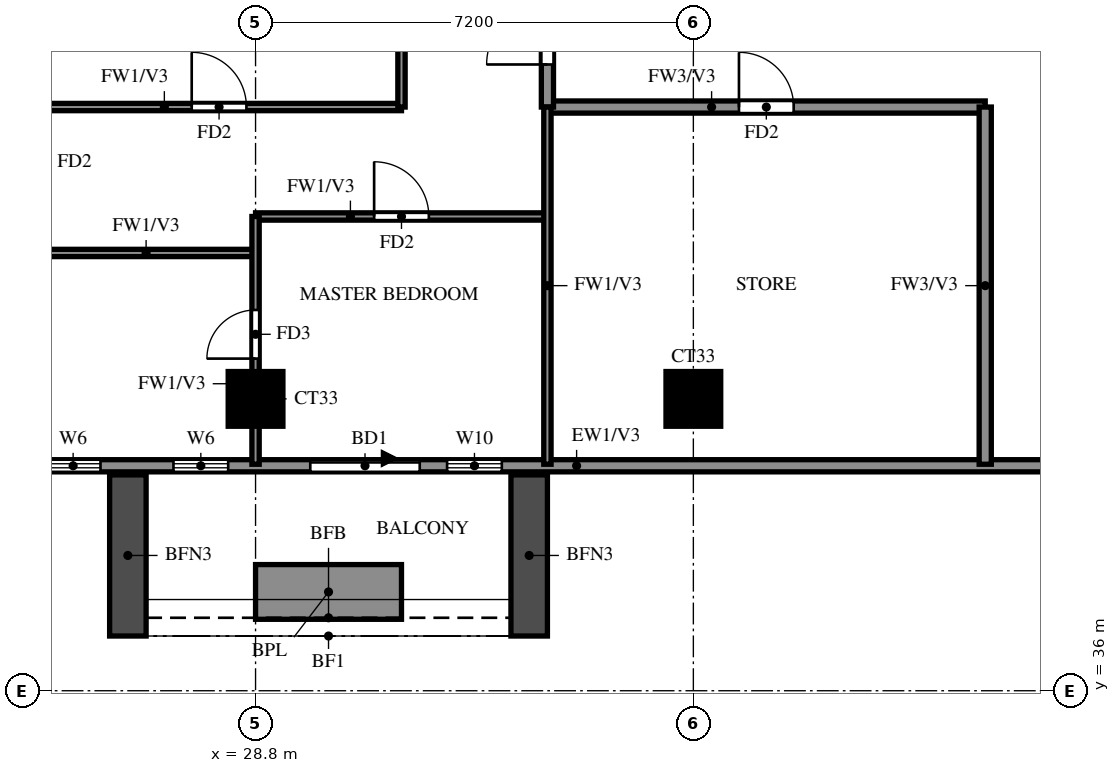
"""IFC4 building model, lengths in metres.
Left out: names, types, materials, properties, quantities, classifications, styles, units other than length and angle.
Written with IfcOpenShell. Run it as: python <this file> out.ifc"""

import sys

from ifc_helpers import new_model, si_unit, direction, frame, frame_2d, origin, origin_2d, place, context, subcontext, project, spatial, rectangle, extrude, source, transform, mapped, element, fill, save


model = new_model("IFC4")
c1 = context("Model", 3, precision=1e-05, world=origin(), true_north=direction((0.0, 1.0)))
c2 = subcontext(c1, "Body", "Model", "MODEL_VIEW")
j1 = project(units=[si_unit("LENGTHUNIT", "METRE"), si_unit("PLANEANGLEUNIT", "RADIAN")], contexts=[c1])
p1 = place(None, origin())
s1 = spatial("IfcSite", under=j1, at=p1, CompositionType="ELEMENT")
p2 = place(p1, origin())
s2 = spatial("IfcBuilding", under=s1, at=p2, CompositionType="ELEMENT")
p3 = place(p2, frame((0.0, 0.0, 218.5)))
s3 = spatial("IfcBuildingStorey", under=s2, at=p3, CompositionType="ELEMENT", Elevation=218.5)
m1 = source(origin(), c2, "Body", "SweptSolid", [
    extrude(rectangle(XDim=0.9, YDim=0.9, at=origin_2d()), origin(), (0.0, 0.0, 1.0), 3.22),
])
for number, where, z_axis, x_axis in (
    (1, (28.8, 40.8, 0.0), (0.0, 0.0, 1.0), (1.0, 0.0, 0.0)),
    (2, (36.0, 40.8, 0.0), (0.0, 0.0, 1.0), (1.0, 0.0, 0.0)),
):
    element("IfcColumn", number, at=place(p3, frame(where, z_axis=z_axis, x_axis=x_axis)), inside=s3, PredefinedType="COLUMN", context=c2, shape_type="MappedRepresentation", body=[
        mapped(m1, transform((0.0, 0.0, 0.0))),
    ])
p4 = place(p3, frame((22.2, 39.7, 0.0), z_axis=(0.0, 0.0, 1.0), x_axis=(1.0, 0.0, 0.0)))
e3 = element("IfcWall", 3, at=p4, inside=s3, PredefinedType="SOLIDWALL", context=c2, shape_type="SweptSolid", body=[
    extrude(rectangle(XDim=19.8, YDim=0.2, at=frame_2d((9.9, 0.0))), origin(), (0.0, 0.0, 1.0), 3.22),
])
p5 = place(p4, frame((7.5, 0.0, 0.0)))
e4 = element("IfcOpeningElement", 4, at=p5, cuts=e3, PredefinedType="OPENING", context=c2, shape_type="SweptSolid", body=[
    extrude(rectangle(XDim=1.8, YDim=2.4, at=frame_2d((0.9, 1.2))), frame((0.0, 0.11, 0.0), z_axis=(0.0, -1.0, 0.0), x_axis=(1.0, 0.0, 0.0)), (0.0, 0.0, 1.0), 0.22),
])
p6 = place(p4, frame((0.7, 0.0, 0.6)))
e5 = element("IfcOpeningElement", 5, at=p6, cuts=e3, PredefinedType="OPENING", context=c2, shape_type="SweptSolid", body=[
    extrude(rectangle(XDim=1.8, YDim=2.4, at=frame_2d((0.9, 1.2))), frame((0.0, 0.11, 0.0), z_axis=(0.0, -1.0, 0.0), x_axis=(1.0, 0.0, 0.0)), (0.0, 0.0, 1.0), 0.22),
])
p7 = place(p4, frame((9.75, 0.0, 0.6)))
e6 = element("IfcOpeningElement", 6, at=p7, cuts=e3, PredefinedType="OPENING", context=c2, shape_type="SweptSolid", body=[
    extrude(rectangle(XDim=0.9, YDim=2.4, at=frame_2d((0.45, 1.2))), frame((0.0, 0.11, 0.0), z_axis=(0.0, -1.0, 0.0), x_axis=(1.0, 0.0, 0.0)), (0.0, 0.0, 1.0), 0.22),
])
p8 = place(p4, frame((3.15, 0.0, 1.5)))
e7 = element("IfcOpeningElement", 7, at=p8, cuts=e3, PredefinedType="OPENING", context=c2, shape_type="SweptSolid", body=[
    extrude(rectangle(XDim=0.9, YDim=0.9, at=frame_2d((0.45, 0.45))), frame((0.0, 0.11, 0.0), z_axis=(0.0, -1.0, 0.0), x_axis=(1.0, 0.0, 0.0)), (0.0, 0.0, 1.0), 0.22),
])
p9 = place(p4, frame((5.25, 0.0, 1.5)))
e8 = element("IfcOpeningElement", 8, at=p9, cuts=e3, PredefinedType="OPENING", context=c2, shape_type="SweptSolid", body=[
    extrude(rectangle(XDim=0.9, YDim=0.9, at=frame_2d((0.45, 0.45))), frame((0.0, 0.11, 0.0), z_axis=(0.0, -1.0, 0.0), x_axis=(1.0, 0.0, 0.0)), (0.0, 0.0, 1.0), 0.22),
])
for number, where, z_axis, x_axis in (
    (9, (26.7, 39.55, 0.0), (0.0, 0.0, 1.0), (0.0, -1.0, 0.0)),
    (10, (33.3, 39.55, 0.0), (0.0, 0.0, 1.0), (0.0, -1.0, 0.0)),
):
    element("IfcWall", number, at=place(p3, frame(where, z_axis=z_axis, x_axis=x_axis)), inside=s3, PredefinedType="SOLIDWALL", context=c2, shape_type="SweptSolid", body=[
        extrude(rectangle(XDim=2.65, YDim=0.6, at=frame_2d((1.325, 0.0))), origin(), (0.0, 0.0, 1.0), 2.85),
    ])
p10 = place(p3, frame((28.8, 37.625, 0.0), z_axis=(0.0, 0.0, 1.0), x_axis=(1.0, 0.0, 0.0)))
e11 = element("IfcWall", 11, at=p10, inside=s3, PredefinedType="SOLIDWALL", context=c2, shape_type="SweptSolid", body=[
    extrude(rectangle(XDim=2.4, YDim=0.9, at=frame_2d((1.2, 0.0))), origin(), (0.0, 0.0, 1.0), 0.9),
])
p11 = place(p3, frame((33.6, 45.6, 0.0), z_axis=(0.0, 0.0, 1.0), x_axis=(1.0, 0.0, 0.0)))
e12 = element("IfcWall", 12, at=p11, inside=s3, PredefinedType="SOLIDWALL", context=c2, shape_type="SweptSolid", body=[
    extrude(rectangle(XDim=7.2, YDim=0.2, at=frame_2d((3.6, 0.0))), origin(), (0.0, 0.0, 1.0), 3.22),
])
p12 = place(p11, frame((3.15, 0.0, 0.0)))
e13 = element("IfcOpeningElement", 13, at=p12, cuts=e12, PredefinedType="OPENING", context=c2, shape_type="SweptSolid", body=[
    extrude(rectangle(XDim=0.9, YDim=2.1, at=frame_2d((0.45, 1.05))), frame((0.0, 0.11, 0.0), z_axis=(0.0, -1.0, 0.0), x_axis=(1.0, 0.0, 0.0)), (0.0, 0.0, 1.0), 0.22),
])
p13 = place(p3, frame((33.6, 45.6, 0.0), z_axis=(0.0, 0.0, 1.0), x_axis=(0.0, 1.0, 0.0)))
e14 = element("IfcWall", 14, at=p13, inside=s3, PredefinedType="SOLIDWALL", context=c2, shape_type="SweptSolid", body=[
    extrude(rectangle(XDim=8.4, YDim=0.2, at=frame_2d((4.2, 0.0))), origin(), (0.0, 0.0, 1.0), 3.22),
])
p14 = place(p13, frame((0.7, 0.0, 0.0)))
e15 = element("IfcOpeningElement", 15, at=p14, cuts=e14, PredefinedType="OPENING", context=c2, shape_type="SweptSolid", body=[
    extrude(rectangle(XDim=1.0, YDim=2.1, at=frame_2d((0.5, 1.05))), frame((0.0, 0.11, 0.0), z_axis=(0.0, -1.0, 0.0), x_axis=(1.0, 0.0, 0.0)), (0.0, 0.0, 1.0), 0.22),
])
p15 = place(p13, frame((6.7, 0.0, 0.0)))
e16 = element("IfcOpeningElement", 16, at=p15, cuts=e14, PredefinedType="OPENING", context=c2, shape_type="SweptSolid", body=[
    extrude(rectangle(XDim=1.0, YDim=2.1, at=frame_2d((0.5, 1.05))), frame((0.0, 0.11, 0.0), z_axis=(0.0, -1.0, 0.0), x_axis=(1.0, 0.0, 0.0)), (0.0, 0.0, 1.0), 0.22),
])
p16 = place(p3, frame((40.8, 39.725, 0.0), z_axis=(0.0, 0.0, 1.0), x_axis=(0.0, 1.0, 0.0)))
e17 = element("IfcWall", 17, at=p16, inside=s3, PredefinedType="SOLIDWALL", context=c2, shape_type="SweptSolid", body=[
    extrude(rectangle(XDim=5.875, YDim=0.2, at=frame_2d((2.938, 0.0))), origin(), (0.0, 0.0, 1.0), 3.22),
])
p17 = place(p3, frame((25.2, 43.2, 0.0), z_axis=(0.0, 0.0, 1.0), x_axis=(1.0, 0.0, 0.0)))
e18 = element("IfcWall", 18, at=p17, inside=s3, PredefinedType="PARTITIONING", context=c2, shape_type="SweptSolid", body=[
    extrude(rectangle(XDim=3.6, YDim=0.12, at=frame_2d((1.8, 0.0))), origin(), (0.0, 0.0, 1.0), 3.22),
])
p18 = place(p3, frame((28.8, 43.8, 0.0), z_axis=(0.0, 0.0, 1.0), x_axis=(1.0, 0.0, 0.0)))
e19 = element("IfcWall", 19, at=p18, inside=s3, PredefinedType="PARTITIONING", context=c2, shape_type="SweptSolid", body=[
    extrude(rectangle(XDim=4.8, YDim=0.12, at=frame_2d((2.4, 0.0))), origin(), (0.0, 0.0, 1.0), 3.22),
])
p19 = place(p18, frame((1.95, 0.0, 0.0)))
e20 = element("IfcOpeningElement", 20, at=p19, cuts=e19, PredefinedType="OPENING", context=c2, shape_type="SweptSolid", body=[
    extrude(rectangle(XDim=0.9, YDim=2.1, at=frame_2d((0.45, 1.05))), frame((0.0, 0.07, 0.0), z_axis=(0.0, -1.0, 0.0), x_axis=(1.0, 0.0, 0.0)), (0.0, 0.0, 1.0), 0.14),
])
p20 = place(p3, frame((25.2, 45.6, 0.0), z_axis=(0.0, 0.0, 1.0), x_axis=(1.0, 0.0, 0.0)))
e21 = element("IfcWall", 21, at=p20, inside=s3, PredefinedType="PARTITIONING", context=c2, shape_type="SweptSolid", body=[
    extrude(rectangle(XDim=6.0, YDim=0.12, at=frame_2d((3.0, 0.0))), origin(), (0.0, 0.0, 1.0), 3.22),
])
p21 = place(p20, frame((2.55, 0.0, 0.0)))
e22 = element("IfcOpeningElement", 22, at=p21, cuts=e21, PredefinedType="OPENING", context=c2, shape_type="SweptSolid", body=[
    extrude(rectangle(XDim=0.9, YDim=2.1, at=frame_2d((0.45, 1.05))), frame((0.0, 0.07, 0.0), z_axis=(0.0, -1.0, 0.0), x_axis=(1.0, 0.0, 0.0)), (0.0, 0.0, 1.0), 0.14),
])
p22 = place(p3, frame((28.8, 39.725, 0.0), z_axis=(0.0, 0.0, 1.0), x_axis=(0.0, 1.0, 0.0)))
e23 = element("IfcWall", 23, at=p22, inside=s3, PredefinedType="PARTITIONING", context=c2, shape_type="SweptSolid", body=[
    extrude(rectangle(XDim=4.075, YDim=0.12, at=frame_2d((2.038, 0.0))), origin(), (0.0, 0.0, 1.0), 3.22),
])
p23 = place(p22, frame((1.738, 0.0, 0.0)))
e24 = element("IfcOpeningElement", 24, at=p23, cuts=e23, PredefinedType="OPENING", context=c2, shape_type="SweptSolid", body=[
    extrude(rectangle(XDim=0.8, YDim=2.1, at=frame_2d((0.4, 1.05))), frame((0.0, 0.07, 0.0), z_axis=(0.0, -1.0, 0.0), x_axis=(1.0, 0.0, 0.0)), (0.0, 0.0, 1.0), 0.14),
])
p24 = place(p3, frame((31.2, 45.6, 0.0), z_axis=(0.0, 0.0, 1.0), x_axis=(0.0, 1.0, 0.0)))
e25 = element("IfcWall", 25, at=p24, inside=s3, PredefinedType="PARTITIONING", context=c2, shape_type="SweptSolid", body=[
    extrude(rectangle(XDim=2.4, YDim=0.12, at=frame_2d((1.2, 0.0))), origin(), (0.0, 0.0, 1.0), 3.22),
])
p25 = place(p3, frame((33.6, 39.725, 0.0), z_axis=(0.0, 0.0, 1.0), x_axis=(0.0, 1.0, 0.0)))
e26 = element("IfcWall", 26, at=p25, inside=s3, PredefinedType="PARTITIONING", context=c2, shape_type="SweptSolid", body=[
    extrude(rectangle(XDim=5.875, YDim=0.12, at=frame_2d((2.938, 0.0))), origin(), (0.0, 0.0, 1.0), 3.22),
])
p26 = place(p5, origin())
e27 = element("IfcDoor", 27, at=p26, inside=s3, OperationType="DOUBLE_DOOR_SLIDING", PredefinedType="DOOR", context=c2, shape_type="SweptSolid", body=[
    extrude(rectangle(XDim=1.8, YDim=2.4, at=frame_2d((0.9, 1.2))), frame((0.0, 0.025, 0.0), z_axis=(0.0, -1.0, 0.0), x_axis=(1.0, 0.0, 0.0)), (0.0, 0.0, 1.0), 0.05),
])
fill(e4, e27)
p27 = place(p7, origin())
e28 = element("IfcWindow", 28, at=p27, inside=s3, PartitioningType="SINGLE_PANEL", PredefinedType="WINDOW", context=c2, shape_type="SweptSolid", body=[
    extrude(rectangle(XDim=0.9, YDim=2.4, at=frame_2d((0.45, 1.2))), frame((0.0, 0.03, 0.0), z_axis=(0.0, -1.0, 0.0), x_axis=(1.0, 0.0, 0.0)), (0.0, 0.0, 1.0), 0.06),
])
fill(e6, e28)
p28 = place(p8, origin())
e29 = element("IfcWindow", 29, at=p28, inside=s3, PartitioningType="SINGLE_PANEL", PredefinedType="WINDOW", context=c2, shape_type="SweptSolid", body=[
    extrude(rectangle(XDim=0.9, YDim=0.9, at=frame_2d((0.45, 0.45))), frame((0.0, 0.03, 0.0), z_axis=(0.0, -1.0, 0.0), x_axis=(1.0, 0.0, 0.0)), (0.0, 0.0, 1.0), 0.06),
])
fill(e7, e29)
p29 = place(p9, origin())
e30 = element("IfcWindow", 30, at=p29, inside=s3, PartitioningType="SINGLE_PANEL", PredefinedType="WINDOW", context=c2, shape_type="SweptSolid", body=[
    extrude(rectangle(XDim=0.9, YDim=0.9, at=frame_2d((0.45, 0.45))), frame((0.0, 0.03, 0.0), z_axis=(0.0, -1.0, 0.0), x_axis=(1.0, 0.0, 0.0)), (0.0, 0.0, 1.0), 0.06),
])
fill(e8, e30)
p30 = place(p14, origin())
e31 = element("IfcDoor", 31, at=p30, inside=s3, OperationType="SINGLE_SWING_LEFT", PredefinedType="DOOR", context=c2, shape_type="SweptSolid", body=[
    extrude(rectangle(XDim=1.0, YDim=2.1, at=frame_2d((0.5, 1.05))), frame((0.0, 0.025, 0.0), z_axis=(0.0, -1.0, 0.0), x_axis=(1.0, 0.0, 0.0)), (0.0, 0.0, 1.0), 0.05),
])
fill(e15, e31)
p31 = place(p19, origin())
e32 = element("IfcDoor", 32, at=p31, inside=s3, OperationType="SINGLE_SWING_RIGHT", PredefinedType="DOOR", context=c2, shape_type="SweptSolid", body=[
    extrude(rectangle(XDim=0.9, YDim=2.1, at=frame_2d((0.45, 1.05))), frame((0.0, 0.025, 0.0), z_axis=(0.0, -1.0, 0.0), x_axis=(1.0, 0.0, 0.0)), (0.0, 0.0, 1.0), 0.05),
])
fill(e20, e32)
p32 = place(p23, origin())
e33 = element("IfcDoor", 33, at=p32, inside=s3, OperationType="SINGLE_SWING_RIGHT", PredefinedType="DOOR", context=c2, shape_type="SweptSolid", body=[
    extrude(rectangle(XDim=0.8, YDim=2.1, at=frame_2d((0.4, 1.05))), frame((0.0, 0.025, 0.0), z_axis=(0.0, -1.0, 0.0), x_axis=(1.0, 0.0, 0.0)), (0.0, 0.0, 1.0), 0.05),
])
fill(e24, e33)
p33 = place(p21, origin())
e34 = element("IfcDoor", 34, at=p33, inside=s3, OperationType="SINGLE_SWING_LEFT", PredefinedType="DOOR", context=c2, shape_type="SweptSolid", body=[
    extrude(rectangle(XDim=0.9, YDim=2.1, at=frame_2d((0.45, 1.05))), frame((0.0, 0.025, 0.0), z_axis=(0.0, -1.0, 0.0), x_axis=(1.0, 0.0, 0.0)), (0.0, 0.0, 1.0), 0.05),
])
fill(e22, e34)
p34 = place(p12, origin())
e35 = element("IfcDoor", 35, at=p34, inside=s3, OperationType="SINGLE_SWING_RIGHT", PredefinedType="DOOR", context=c2, shape_type="SweptSolid", body=[
    extrude(rectangle(XDim=0.9, YDim=2.1, at=frame_2d((0.45, 1.05))), frame((0.0, 0.025, 0.0), z_axis=(0.0, -1.0, 0.0), x_axis=(1.0, 0.0, 0.0)), (0.0, 0.0, 1.0), 0.05),
])
fill(e13, e35)
save(model, sys.argv[1])
